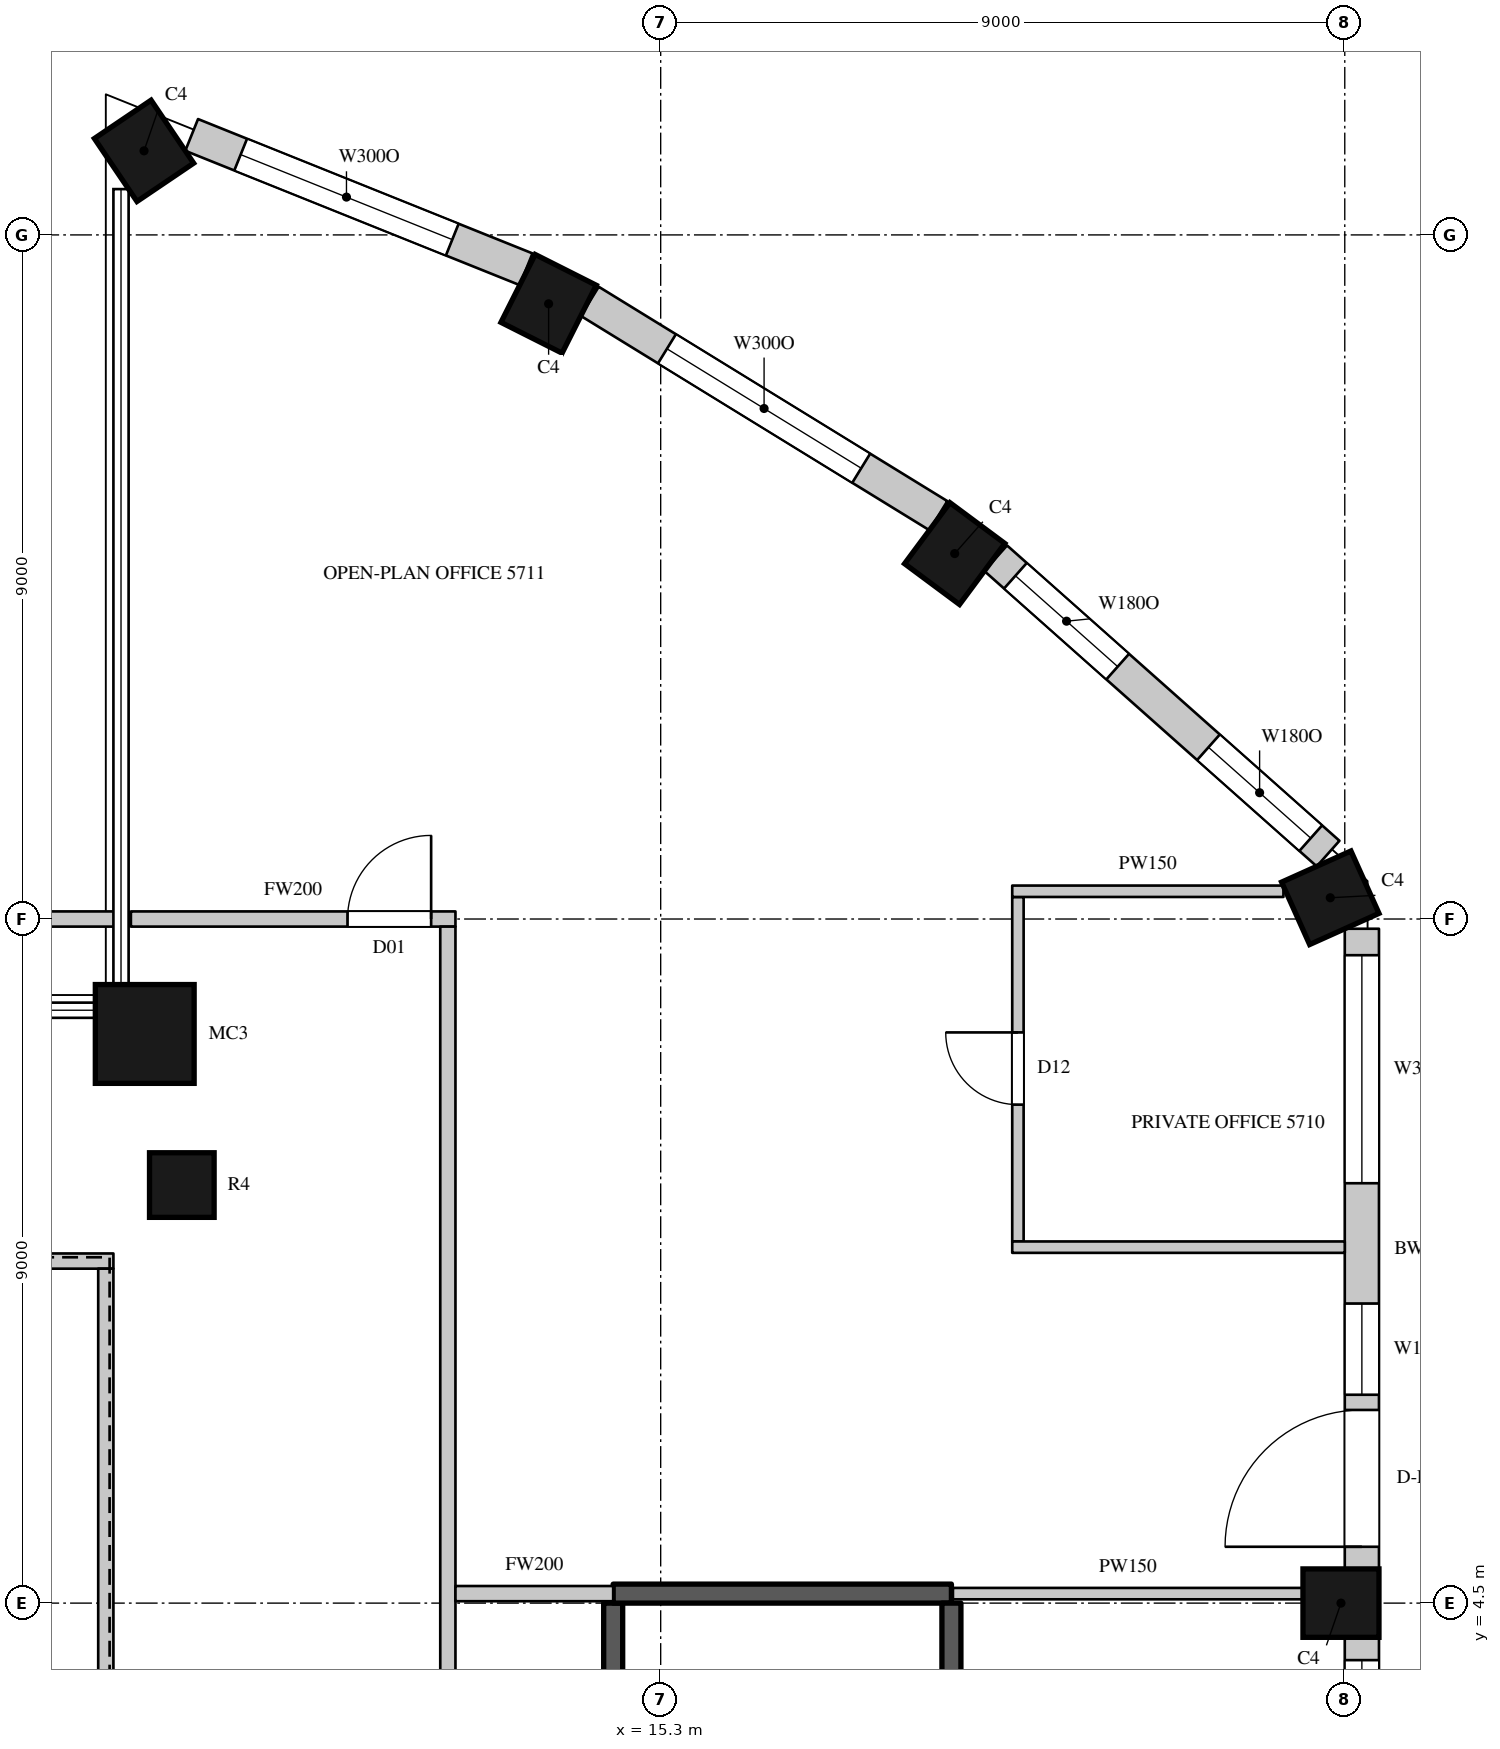
"""IFC4 building model, lengths in metres.
Left out: names, types, materials, properties, quantities, classifications, styles, units other than length and angle.
Written with IfcOpenShell. Run it as: python <this file> out.ifc"""

import sys

from ifc_helpers import new_model, si_unit, direction, frame, frame_2d, origin, origin_2d, place, context, subcontext, project, spatial, rectangle, circle, extrude, element, fill, save


model = new_model("IFC4")
c1 = context("Model", 3, precision=1e-05, world=origin(), true_north=direction((0.0, 1.0)))
c2 = subcontext(c1, "Body", "Model", "MODEL_VIEW")
j1 = project(units=[si_unit("LENGTHUNIT", "METRE"), si_unit("PLANEANGLEUNIT", "RADIAN")], contexts=[c1])
p1 = place(None, origin())
s1 = spatial("IfcSite", under=j1, at=p1, CompositionType="ELEMENT")
p2 = place(p1, origin())
s2 = spatial("IfcBuilding", under=s1, at=p2, CompositionType="ELEMENT")
p3 = place(p2, frame((0.0, 0.0, 255.7)))
s3 = spatial("IfcBuildingStorey", under=s2, at=p3, CompositionType="ELEMENT", Elevation=255.7)
p4 = place(p3, frame((8.503, 23.606, 0.0), z_axis=(0.0, 0.0, 1.0), x_axis=(-0.828469606019, -0.560034027451, 0.0)))
e1 = element("IfcColumn", 1, at=p4, inside=s3, PredefinedType="COLUMN", context=c2, shape_type="SweptSolid", body=[
    extrude(rectangle(XDim=0.9, YDim=1.0, at=origin_2d()), origin(), (0.0, 0.0, 1.0), 4.1),
])
p5 = place(p3, frame((8.512, 11.988, 0.0), z_axis=(0.0, 0.0, 1.0), x_axis=(1.0, 0.0, 0.0)))
e2 = element("IfcColumn", 2, at=p5, inside=s3, PredefinedType="COLUMN", context=c2, shape_type="SweptSolid", body=[
    extrude(circle(Radius=0.65, at=origin_2d()), origin(), (0.0, 0.0, 1.0), 4.1),
])
for number, where, z_axis, x_axis in (
    (3, (24.25, 4.5, 0.0), (0.0, 0.0, 1.0), (0.0, 1.0, 0.0)),
    (4, (24.11, 13.78, 0.0), (0.0, 0.0, 1.0), (-0.41, 0.912, 0.0)),
    (5, (19.168, 18.308, 0.0), (0.0, 0.0, 1.0), (-0.803, 0.596, 0.0)),
    (6, (13.826, 21.594, 0.0), (0.0, 0.0, 1.0), (-0.893, 0.45, 0.0)),
):
    element("IfcColumn", number, at=place(p3, frame(where, z_axis=z_axis, x_axis=x_axis)), inside=s3, PredefinedType="COLUMN", context=c2, shape_type="SweptSolid", body=[
        extrude(rectangle(XDim=0.9, YDim=1.0, at=origin_2d()), origin(), (0.0, 0.0, 1.0), 4.1),
    ])
p6 = place(p3, frame((9.0, 10.0, 0.0), z_axis=(0.0, 0.0, 1.0), x_axis=(1.0, 0.0, 0.0)))
e7 = element("IfcColumn", 7, at=p6, inside=s3, PredefinedType="COLUMN", context=c2, shape_type="SweptSolid", body=[
    extrude(circle(Radius=0.425, at=origin_2d()), origin(), (0.0, 0.0, 1.0), 4.1),
])
p7 = place(p3, frame((24.525, -4.05, 0.0), z_axis=(0.0, 0.0, 1.0), x_axis=(0.0, 1.0, 0.0)))
e8 = element("IfcWall", 8, at=p7, inside=s3, PredefinedType="SOLIDWALL", context=c2, shape_type="SweptSolid", body=[
    extrude(rectangle(XDim=8.1, YDim=0.45, at=frame_2d((4.05, 0.0))), origin(), (0.0, 0.0, 1.0), 3.8),
])
p8 = place(p7, frame((0.3, 0.0, 1.05)))
e9 = element("IfcOpeningElement", 9, at=p8, cuts=e8, PredefinedType="OPENING", context=c2, shape_type="SweptSolid", body=[
    extrude(rectangle(XDim=3.0, YDim=2.4, at=frame_2d((1.5, 1.2))), frame((0.0, 0.235, 0.0), z_axis=(0.0, -1.0, 0.0), x_axis=(1.0, 0.0, 0.0)), (0.0, 0.0, 1.0), 0.47),
])
p9 = place(p7, frame((4.8, 0.0, 1.05)))
e10 = element("IfcOpeningElement", 10, at=p9, cuts=e8, PredefinedType="OPENING", context=c2, shape_type="SweptSolid", body=[
    extrude(rectangle(XDim=3.0, YDim=2.4, at=frame_2d((1.5, 1.2))), frame((0.0, 0.235, 0.0), z_axis=(0.0, -1.0, 0.0), x_axis=(1.0, 0.0, 0.0)), (0.0, 0.0, 1.0), 0.47),
])
p10 = place(p3, frame((24.525, 4.95, 0.0), z_axis=(0.0, 0.0, 1.0), x_axis=(0.0, 1.0, 0.0)))
e11 = element("IfcWall", 11, at=p10, inside=s3, PredefinedType="SOLIDWALL", context=c2, shape_type="SweptSolid", body=[
    extrude(rectangle(XDim=8.422, YDim=0.45, at=frame_2d((4.211, 0.0))), origin(), (0.0, 0.0, 1.0), 3.8),
])
p11 = place(p10, frame((0.291, 0.0, 0.0)))
e12 = element("IfcOpeningElement", 12, at=p11, cuts=e11, PredefinedType="OPENING", context=c2, shape_type="SweptSolid", body=[
    extrude(rectangle(XDim=1.8, YDim=2.4, at=frame_2d((0.9, 1.2))), frame((0.0, 0.235, 0.0), z_axis=(0.0, -1.0, 0.0), x_axis=(1.0, 0.0, 0.0)), (0.0, 0.0, 1.0), 0.47),
])
p12 = place(p10, frame((2.291, 0.0, 1.05)))
e13 = element("IfcOpeningElement", 13, at=p12, cuts=e11, PredefinedType="OPENING", context=c2, shape_type="SweptSolid", body=[
    extrude(rectangle(XDim=1.2, YDim=2.4, at=frame_2d((0.6, 1.2))), frame((0.0, 0.235, 0.0), z_axis=(0.0, -1.0, 0.0), x_axis=(1.0, 0.0, 0.0)), (0.0, 0.0, 1.0), 0.47),
])
p13 = place(p10, frame((5.074, 0.0, 1.05)))
e14 = element("IfcOpeningElement", 14, at=p13, cuts=e11, PredefinedType="OPENING", context=c2, shape_type="SweptSolid", body=[
    extrude(rectangle(XDim=3.0, YDim=2.4, at=frame_2d((1.5, 1.2))), frame((0.0, 0.235, 0.0), z_axis=(0.0, -1.0, 0.0), x_axis=(1.0, 0.0, 0.0)), (0.0, 0.0, 1.0), 0.47),
])
p14 = place(p3, frame((24.081, 14.361, 0.0), z_axis=(0.0, 0.0, 1.0), x_axis=(-0.747570482973, 0.664182484704, 0.0)))
e15 = element("IfcWall", 15, at=p14, inside=s3, PredefinedType="SOLIDWALL", context=c2, shape_type="SweptSolid", body=[
    extrude(rectangle(XDim=5.85, YDim=0.45, at=frame_2d((2.925, 0.0))), origin(), (0.0, 0.0, 1.0), 3.8),
])
p15 = place(p14, frame((0.305, 0.0, 1.05)))
e16 = element("IfcOpeningElement", 16, at=p15, cuts=e15, PredefinedType="OPENING", context=c2, shape_type="SweptSolid", body=[
    extrude(rectangle(XDim=1.8, YDim=2.4, at=frame_2d((0.9, 1.2))), frame((0.0, 0.235, 0.0), z_axis=(0.0, -1.0, 0.0), x_axis=(1.0, 0.0, 0.0)), (0.0, 0.0, 1.0), 0.47),
])
p16 = place(p14, frame((3.703, 0.0, 1.05)))
e17 = element("IfcOpeningElement", 17, at=p16, cuts=e15, PredefinedType="OPENING", context=c2, shape_type="SweptSolid", body=[
    extrude(rectangle(XDim=1.8, YDim=2.4, at=frame_2d((0.9, 1.2))), frame((0.0, 0.235, 0.0), z_axis=(0.0, -1.0, 0.0), x_axis=(1.0, 0.0, 0.0)), (0.0, 0.0, 1.0), 0.47),
])
p17 = place(p3, frame((18.953, 18.806, 0.0), z_axis=(0.0, 0.0, 1.0), x_axis=(-0.851860664503, 0.523768468193, 0.0)))
e18 = element("IfcWall", 18, at=p17, inside=s3, PredefinedType="SOLIDWALL", context=c2, shape_type="SweptSolid", body=[
    extrude(rectangle(XDim=5.384, YDim=0.45, at=frame_2d((2.692, 0.0))), origin(), (0.0, 0.0, 1.0), 3.8),
])
p18 = place(p17, frame((1.192, 0.0, 1.05)))
e19 = element("IfcOpeningElement", 19, at=p18, cuts=e18, PredefinedType="OPENING", context=c2, shape_type="SweptSolid", body=[
    extrude(rectangle(XDim=3.0, YDim=2.4, at=frame_2d((1.5, 1.2))), frame((0.0, 0.235, 0.0), z_axis=(0.0, -1.0, 0.0), x_axis=(1.0, 0.0, 0.0)), (0.0, 0.0, 1.0), 0.47),
])
p19 = place(p3, frame((13.529, 22.048, 0.0), z_axis=(0.0, 0.0, 1.0), x_axis=(-0.927957332619, 0.372686448424, 0.0)))
e20 = element("IfcWall", 20, at=p19, inside=s3, PredefinedType="SOLIDWALL", context=c2, shape_type="SweptSolid", body=[
    extrude(rectangle(XDim=4.741, YDim=0.45, at=frame_2d((2.371, 0.0))), origin(), (0.0, 0.0, 1.0), 3.8),
])
p20 = place(p19, frame((1.047, 0.0, 1.05)))
e21 = element("IfcOpeningElement", 21, at=p20, cuts=e20, PredefinedType="OPENING", context=c2, shape_type="SweptSolid", body=[
    extrude(rectangle(XDim=3.0, YDim=2.4, at=frame_2d((1.5, 1.2))), frame((0.0, 0.235, 0.0), z_axis=(0.0, -1.0, 0.0), x_axis=(1.0, 0.0, 0.0)), (0.0, 0.0, 1.0), 0.47),
])
p21 = place(p3, frame((-6.27, 13.5, 0.0), z_axis=(0.0, 0.0, 1.0), x_axis=(1.0, 0.0, 0.0)))
e22 = element("IfcWall", 22, at=p21, inside=s3, PredefinedType="PARTITIONING", context=c2, shape_type="SweptSolid", body=[
    extrude(rectangle(XDim=14.57, YDim=0.2, at=frame_2d((7.285, 0.0))), origin(), (0.0, 0.0, 1.0), 3.8),
])
p22 = place(p3, frame((-6.1, 9.0, 0.0), z_axis=(0.0, 0.0, 1.0), x_axis=(1.0, 0.0, 0.0)))
e23 = element("IfcWall", 23, at=p22, inside=s3, PredefinedType="PARTITIONING", context=c2, shape_type="SweptSolid", body=[
    extrude(rectangle(XDim=14.2, YDim=0.2, at=frame_2d((7.1, 0.0))), origin(), (0.0, 0.0, 1.0), 3.8),
])
p23 = place(p3, frame((8.0, -8.9, 0.0), z_axis=(0.0, 0.0, 1.0), x_axis=(0.0, 1.0, 0.0)))
e24 = element("IfcWall", 24, at=p23, inside=s3, PredefinedType="PARTITIONING", context=c2, shape_type="SweptSolid", body=[
    extrude(rectangle(XDim=17.8, YDim=0.2, at=frame_2d((8.9, 0.0))), origin(), (0.0, 0.0, 1.0), 3.8),
])
p24 = place(p3, frame((8.33, 13.5, 0.0), z_axis=(0.0, 0.0, 1.0), x_axis=(1.0, 0.0, 0.0)))
e25 = element("IfcWall", 25, at=p24, inside=s3, PredefinedType="PARTITIONING", context=c2, shape_type="SweptSolid", body=[
    extrude(rectangle(XDim=4.27, YDim=0.2, at=frame_2d((2.135, 0.0))), origin(), (0.0, 0.0, 1.0), 3.8),
])
p25 = place(p24, frame((2.85, 0.0, 0.0)))
e26 = element("IfcOpeningElement", 26, at=p25, cuts=e25, PredefinedType="OPENING", context=c2, shape_type="SweptSolid", body=[
    extrude(rectangle(XDim=1.1, YDim=2.4, at=frame_2d((0.55, 1.2))), frame((0.0, 0.11, 0.0), z_axis=(0.0, -1.0, 0.0), x_axis=(1.0, 0.0, 0.0)), (0.0, 0.0, 1.0), 0.22),
])
p26 = place(p3, frame((12.5, -13.5, 0.0), z_axis=(0.0, 0.0, 1.0), x_axis=(0.0, 1.0, 0.0)))
e27 = element("IfcWall", 27, at=p26, inside=s3, PredefinedType="PARTITIONING", context=c2, shape_type="SweptSolid", body=[
    extrude(rectangle(XDim=26.9, YDim=0.2, at=frame_2d((13.45, 0.0))), origin(), (0.0, 0.0, 1.0), 3.8),
])
p27 = place(p26, frame((12.75, 0.0, 0.0)))
e28 = element("IfcOpeningElement", 28, at=p27, cuts=e27, PredefinedType="OPENING", context=c2, shape_type="SweptSolid", body=[
    extrude(rectangle(XDim=1.5, YDim=2.4, at=frame_2d((0.75, 1.2))), frame((0.0, 0.11, 0.0), z_axis=(0.0, -1.0, 0.0), x_axis=(1.0, 0.0, 0.0)), (0.0, 0.0, 1.0), 0.22),
])
p28 = place(p3, frame((12.6, 4.625, 0.0), z_axis=(0.0, 0.0, 1.0), x_axis=(1.0, 0.0, 0.0)))
e29 = element("IfcWall", 29, at=p28, inside=s3, PredefinedType="PARTITIONING", context=c2, shape_type="SweptSolid", body=[
    extrude(rectangle(XDim=2.075, YDim=0.2, at=frame_2d((1.038, 0.0))), origin(), (0.0, 0.0, 1.0), 3.8),
])
p29 = place(p3, frame((19.145, 4.625, 0.0), z_axis=(0.0, 0.0, 1.0), x_axis=(1.0, 0.0, 0.0)))
e30 = element("IfcWall", 30, at=p29, inside=s3, PredefinedType="PARTITIONING", context=c2, shape_type="SweptSolid", body=[
    extrude(rectangle(XDim=4.605, YDim=0.15, at=frame_2d((2.302, 0.0))), origin(), (0.0, 0.0, 1.0), 3.8),
])
p30 = place(p3, frame((20.0, 9.258, 0.0), z_axis=(0.0, 0.0, 1.0), x_axis=(0.0, 1.0, 0.0)))
e31 = element("IfcWall", 31, at=p30, inside=s3, PredefinedType="PARTITIONING", context=c2, shape_type="SweptSolid", body=[
    extrude(rectangle(XDim=4.532, YDim=0.15, at=frame_2d((2.266, 0.0))), origin(), (0.0, 0.0, 1.0), 3.8),
])
p31 = place(p30, frame((1.8, 0.0, 0.0)))
e32 = element("IfcOpeningElement", 32, at=p31, cuts=e31, PredefinedType="OPENING", context=c2, shape_type="SweptSolid", body=[
    extrude(rectangle(XDim=0.95, YDim=2.2, at=frame_2d((0.475, 1.1))), frame((0.0, 0.085, 0.0), z_axis=(0.0, -1.0, 0.0), x_axis=(1.0, 0.0, 0.0)), (0.0, 0.0, 1.0), 0.17),
])
p32 = place(p3, frame((19.925, 9.183, 0.0), z_axis=(0.0, 0.0, 1.0), x_axis=(1.0, 0.0, 0.0)))
e33 = element("IfcWall", 33, at=p32, inside=s3, PredefinedType="PARTITIONING", context=c2, shape_type="SweptSolid", body=[
    extrude(rectangle(XDim=4.375, YDim=0.15, at=frame_2d((2.188, 0.0))), origin(), (0.0, 0.0, 1.0), 3.15),
])
p33 = place(p3, frame((19.925, 13.865, 0.0), z_axis=(0.0, 0.0, 1.0), x_axis=(1.0, 0.0, 0.0)))
e34 = element("IfcWall", 34, at=p33, inside=s3, PredefinedType="PARTITIONING", context=c2, shape_type="SweptSolid", body=[
    extrude(rectangle(XDim=3.568, YDim=0.15, at=frame_2d((1.784, 0.0))), origin(), (0.0, 0.0, 1.0), 3.8),
])
p34 = place(p3, frame((14.675, -4.5, 0.0), z_axis=(0.0, 0.0, 1.0), x_axis=(0.0, 1.0, 0.0)))
e35 = element("IfcWall", 35, at=p34, inside=s3, PredefinedType="SHEAR", context=c2, shape_type="SweptSolid", body=[
    extrude(rectangle(XDim=9.0, YDim=0.25, at=frame_2d((4.5, 0.0))), origin(), (0.0, 0.0, 1.0), 3.8),
])
p35 = place(p34, frame((0.45, 0.0, 0.0)))
e36 = element("IfcOpeningElement", 36, at=p35, cuts=e35, PredefinedType="OPENING", context=c2, shape_type="SweptSolid", body=[
    extrude(rectangle(XDim=1.1, YDim=2.2, at=frame_2d((0.55, 1.1))), frame((0.0, 0.135, 0.0), z_axis=(0.0, -1.0, 0.0), x_axis=(1.0, 0.0, 0.0)), (0.0, 0.0, 1.0), 0.27),
])
p36 = place(p3, frame((14.675, 4.625, 0.0), z_axis=(0.0, 0.0, 1.0), x_axis=(1.0, 0.0, 0.0)))
e37 = element("IfcWall", 37, at=p36, inside=s3, PredefinedType="SHEAR", context=c2, shape_type="SweptSolid", body=[
    extrude(rectangle(XDim=4.45, YDim=0.25, at=frame_2d((2.225, 0.0))), origin(), (0.0, 0.0, 1.0), 3.8),
])
p37 = place(p3, frame((19.125, -4.5, 0.0), z_axis=(0.0, 0.0, 1.0), x_axis=(0.0, 1.0, 0.0)))
e38 = element("IfcWall", 38, at=p37, inside=s3, PredefinedType="SHEAR", context=c2, shape_type="SweptSolid", body=[
    extrude(rectangle(XDim=9.0, YDim=0.25, at=frame_2d((4.5, 0.0))), origin(), (0.0, 0.0, 1.0), 3.8),
])
p38 = place(p9, origin())
e39 = element("IfcWindow", 39, at=p38, inside=s3, PartitioningType="SINGLE_PANEL", PredefinedType="WINDOW", context=c2, shape_type="SweptSolid", body=[
    extrude(rectangle(XDim=3.0, YDim=2.4, at=frame_2d((1.5, 1.2))), frame((0.0, 0.135, 0.0), z_axis=(0.0, -1.0, 0.0), x_axis=(1.0, 0.0, 0.0)), (0.0, 0.0, 1.0), 0.06),
])
fill(e10, e39)
p39 = place(p11, origin())
e40 = element("IfcDoor", 40, at=p39, inside=s3, OperationType="SLIDING_TO_LEFT", PredefinedType="DOOR", context=c2, shape_type="SweptSolid", body=[
    extrude(rectangle(XDim=1.8, YDim=2.4, at=frame_2d((0.9, 1.2))), frame((0.0, 0.13, 0.0), z_axis=(0.0, -1.0, 0.0), x_axis=(1.0, 0.0, 0.0)), (0.0, 0.0, 1.0), 0.05),
])
fill(e12, e40)
p40 = place(p12, origin())
e41 = element("IfcWindow", 41, at=p40, inside=s3, PartitioningType="SINGLE_PANEL", PredefinedType="WINDOW", context=c2, shape_type="SweptSolid", body=[
    extrude(rectangle(XDim=1.2, YDim=2.4, at=frame_2d((0.6, 1.2))), frame((0.0, 0.135, 0.0), z_axis=(0.0, -1.0, 0.0), x_axis=(1.0, 0.0, 0.0)), (0.0, 0.0, 1.0), 0.06),
])
fill(e13, e41)
p41 = place(p13, origin())
e42 = element("IfcWindow", 42, at=p41, inside=s3, PartitioningType="SINGLE_PANEL", PredefinedType="WINDOW", context=c2, shape_type="SweptSolid", body=[
    extrude(rectangle(XDim=3.0, YDim=2.4, at=frame_2d((1.5, 1.2))), frame((0.0, 0.135, 0.0), z_axis=(0.0, -1.0, 0.0), x_axis=(1.0, 0.0, 0.0)), (0.0, 0.0, 1.0), 0.06),
])
fill(e14, e42)
p42 = place(p15, origin())
e43 = element("IfcWindow", 43, at=p42, inside=s3, PartitioningType="SINGLE_PANEL", PredefinedType="WINDOW", context=c2, shape_type="SweptSolid", body=[
    extrude(rectangle(XDim=1.8, YDim=2.4, at=frame_2d((0.9, 1.2))), frame((0.0, 0.135, 0.0), z_axis=(0.0, -1.0, 0.0), x_axis=(1.0, 0.0, 0.0)), (0.0, 0.0, 1.0), 0.06),
])
fill(e16, e43)
p43 = place(p16, origin())
e44 = element("IfcWindow", 44, at=p43, inside=s3, PartitioningType="SINGLE_PANEL", PredefinedType="WINDOW", context=c2, shape_type="SweptSolid", body=[
    extrude(rectangle(XDim=1.8, YDim=2.4, at=frame_2d((0.9, 1.2))), frame((0.0, 0.135, 0.0), z_axis=(0.0, -1.0, 0.0), x_axis=(1.0, 0.0, 0.0)), (0.0, 0.0, 1.0), 0.06),
])
fill(e17, e44)
p44 = place(p18, origin())
e45 = element("IfcWindow", 45, at=p44, inside=s3, PartitioningType="SINGLE_PANEL", PredefinedType="WINDOW", context=c2, shape_type="SweptSolid", body=[
    extrude(rectangle(XDim=3.0, YDim=2.4, at=frame_2d((1.5, 1.2))), frame((0.0, 0.135, 0.0), z_axis=(0.0, -1.0, 0.0), x_axis=(1.0, 0.0, 0.0)), (0.0, 0.0, 1.0), 0.06),
])
fill(e19, e45)
p45 = place(p20, origin())
e46 = element("IfcWindow", 46, at=p45, inside=s3, PartitioningType="SINGLE_PANEL", PredefinedType="WINDOW", context=c2, shape_type="SweptSolid", body=[
    extrude(rectangle(XDim=3.0, YDim=2.4, at=frame_2d((1.5, 1.2))), frame((0.0, 0.135, 0.0), z_axis=(0.0, -1.0, 0.0), x_axis=(1.0, 0.0, 0.0)), (0.0, 0.0, 1.0), 0.06),
])
fill(e21, e46)
p46 = place(p25, origin())
e47 = element("IfcDoor", 47, at=p46, inside=s3, OperationType="SINGLE_SWING_RIGHT", PredefinedType="DOOR", context=c2, shape_type="SweptSolid", body=[
    extrude(rectangle(XDim=1.1, YDim=2.4, at=frame_2d((0.55, 1.2))), frame((0.0, 0.025, 0.0), z_axis=(0.0, -1.0, 0.0), x_axis=(1.0, 0.0, 0.0)), (0.0, 0.0, 1.0), 0.05),
])
fill(e26, e47)
p47 = place(p31, origin())
e48 = element("IfcDoor", 48, at=p47, inside=s3, OperationType="SINGLE_SWING_RIGHT", PredefinedType="DOOR", context=c2, shape_type="SweptSolid", body=[
    extrude(rectangle(XDim=0.95, YDim=2.2, at=frame_2d((0.475, 1.1))), frame((0.0, 0.025, 0.0), z_axis=(0.0, -1.0, 0.0), x_axis=(1.0, 0.0, 0.0)), (0.0, 0.0, 1.0), 0.05),
])
fill(e32, e48)
save(model, sys.argv[1])
